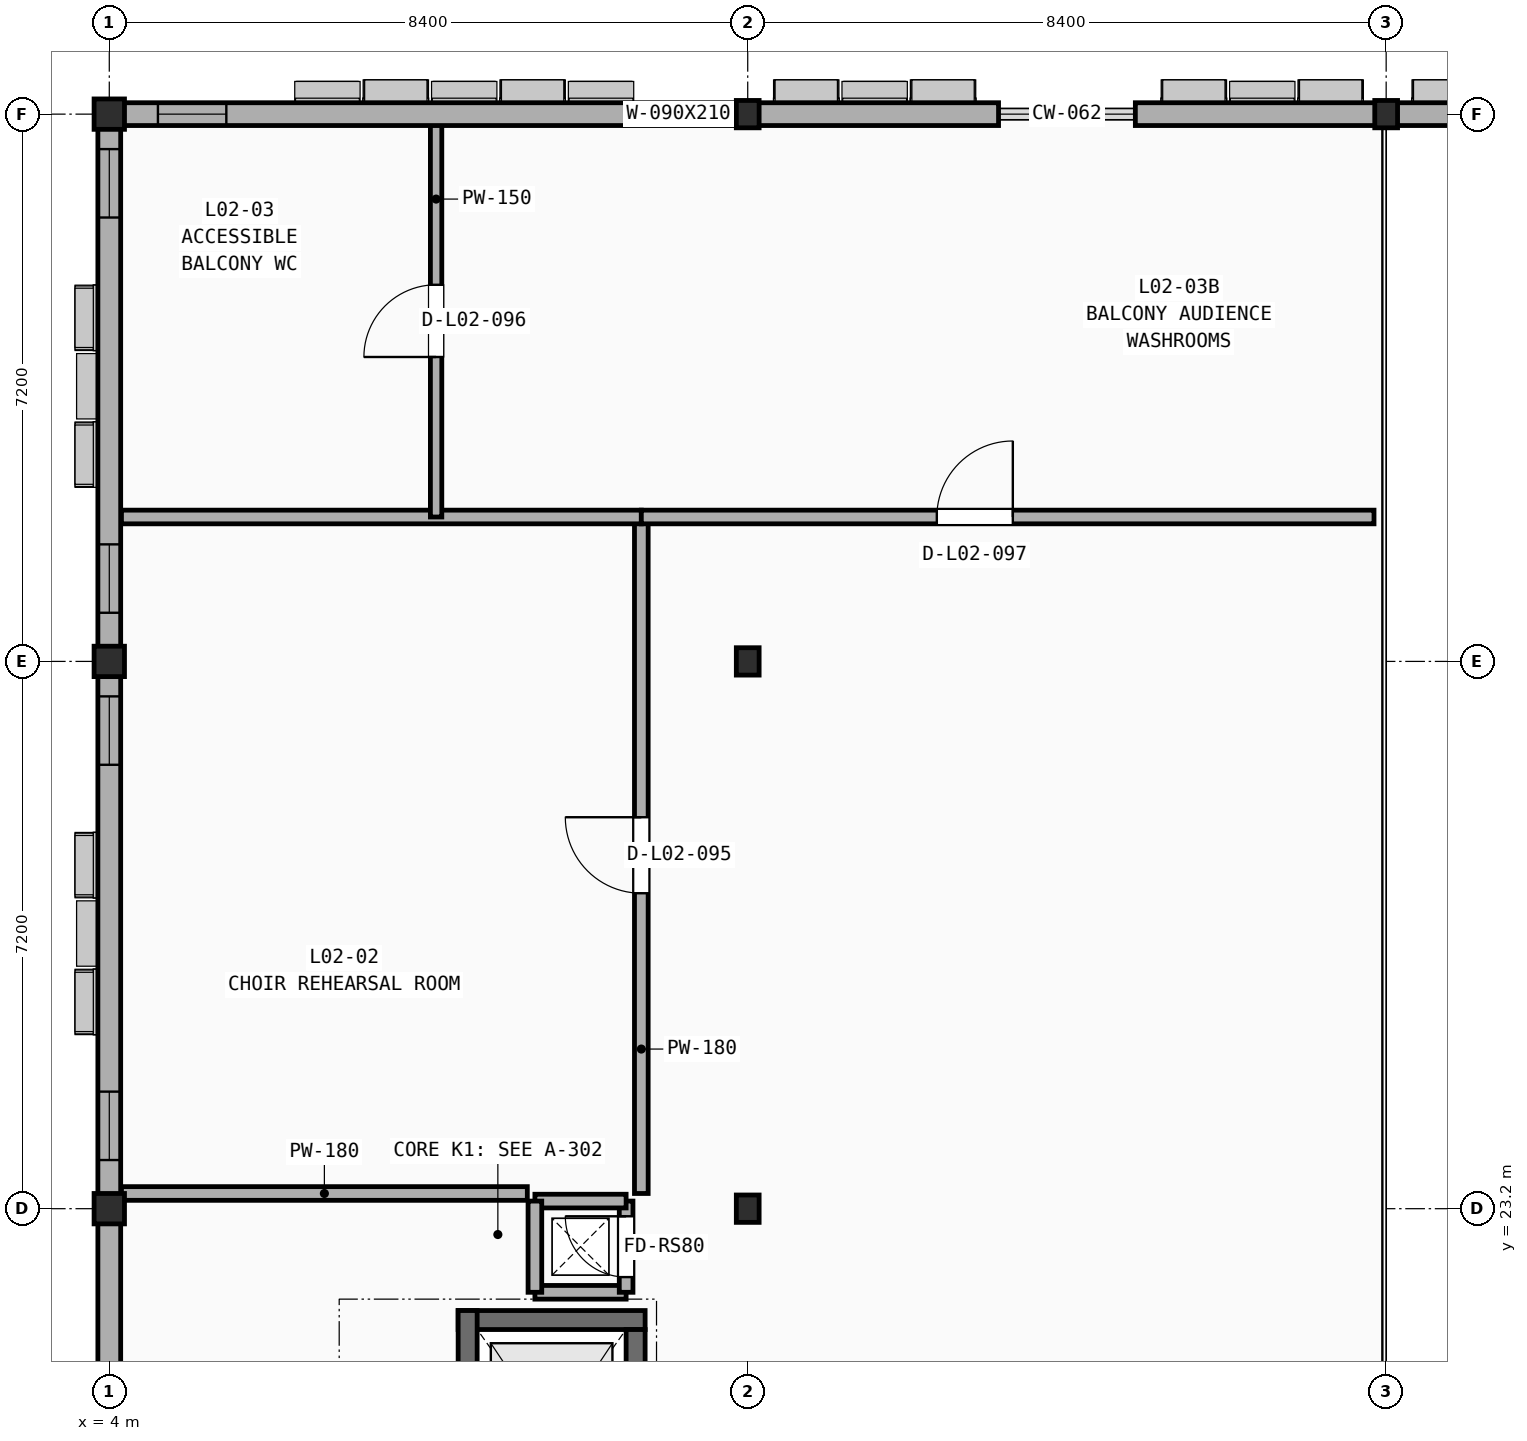
"""IFC4 building model, lengths in metres.
Left out: names, types, materials, properties, quantities, classifications, styles, units other than length and angle.
Written with IfcOpenShell. Run it as: python <this file> out.ifc"""

import sys

from ifc_helpers import new_model, si_unit, direction, frame, frame_2d, origin, origin_2d, place, context, subcontext, project, spatial, rectangle, i_section, extrude, element, fill, save


model = new_model("IFC4")
c1 = context("Model", 3, precision=1e-05, world=origin(), true_north=direction((0.0, 1.0)))
c2 = subcontext(c1, "Body", "Model", "MODEL_VIEW")
j1 = project(units=[si_unit("LENGTHUNIT", "METRE"), si_unit("PLANEANGLEUNIT", "RADIAN")], contexts=[c1])
p1 = place(None, origin())
s1 = spatial("IfcSite", under=j1, at=p1, CompositionType="ELEMENT")
p2 = place(p1, origin())
s2 = spatial("IfcBuilding", under=s1, at=p2, CompositionType="ELEMENT")
p3 = place(p2, frame((0.0, 0.0, 9.6)))
s3 = spatial("IfcBuildingStorey", under=s2, at=p3, CompositionType="ELEMENT", Elevation=9.6)
for number, where, z_axis, x_axis in (
    (1, (4.0, 23.2, 0.0), (0.0, 0.0, 1.0), (1.0, 0.0, 0.0)),
    (2, (4.0, 30.4, 0.0), (0.0, 0.0, 1.0), (1.0, 0.0, 0.0)),
    (3, (4.0, 37.6, 0.0), (0.0, 0.0, 1.0), (1.0, 0.0, 0.0)),
):
    element("IfcColumn", number, at=place(p3, frame(where, z_axis=z_axis, x_axis=x_axis)), inside=s3, PredefinedType="COLUMN", context=c2, shape_type="SweptSolid", body=[
        extrude(rectangle(XDim=0.4, YDim=0.4, at=origin_2d()), origin(), (0.0, 0.0, 1.0), 4.2),
    ])
for number, where, z_axis, x_axis in (
    (4, (12.4, 23.2, 0.0), (0.0, 0.0, 1.0), (1.0, 0.0, 0.0)),
    (5, (12.4, 30.4, 0.0), (0.0, 0.0, 1.0), (1.0, 0.0, 0.0)),
    (6, (12.4, 37.6, 0.0), (0.0, 0.0, 1.0), (1.0, 0.0, 0.0)),
    (7, (20.8, 37.6, 0.0), (0.0, 0.0, 1.0), (1.0, 0.0, 0.0)),
):
    element("IfcColumn", number, at=place(p3, frame(where, z_axis=z_axis, x_axis=x_axis)), inside=s3, PredefinedType="COLUMN", context=c2, shape_type="SweptSolid", body=[
        extrude(i_section(OverallWidth=0.3, OverallDepth=0.36, WebThickness=0.012, FlangeThickness=0.022, at=origin_2d()), origin(), (0.0, 0.0, 1.0), 4.2),
    ])
p4 = place(p3, frame((4.16, 23.4, 0.0), z_axis=(0.0, 0.0, 1.0), x_axis=(1.0, 0.0, 0.0)))
e8 = element("IfcWall", 8, at=p4, inside=s3, PredefinedType="PARTITIONING", context=c2, shape_type="SweptSolid", body=[
    extrude(rectangle(XDim=5.34, YDim=0.18, at=frame_2d((2.67, 0.0))), origin(), (0.0, 0.0, 1.0), 3.63),
])
p5 = place(p3, frame((11.0, 23.4, 0.0), z_axis=(0.0, 0.0, 1.0), x_axis=(0.0, 1.0, 0.0)))
e9 = element("IfcWall", 9, at=p5, inside=s3, PredefinedType="PARTITIONING", context=c2, shape_type="SweptSolid", body=[
    extrude(rectangle(XDim=8.9, YDim=0.18, at=frame_2d((4.45, 0.0))), origin(), (0.0, 0.0, 1.0), 3.27),
])
p6 = place(p5, frame((3.95, 0.0, -0.01)))
e10 = element("IfcOpeningElement", 10, at=p6, cuts=e9, PredefinedType="OPENING", context=c2, shape_type="SweptSolid", body=[
    extrude(rectangle(XDim=1.0, YDim=2.16, at=frame_2d((0.5, 1.08))), frame((0.0, 0.1, 0.0), z_axis=(0.0, -1.0, 0.0), x_axis=(1.0, 0.0, 0.0)), (0.0, 0.0, 1.0), 0.2),
])
p7 = place(p3, frame((4.16, 32.3, 0.0), z_axis=(0.0, 0.0, 1.0), x_axis=(1.0, 0.0, 0.0)))
e11 = element("IfcWall", 11, at=p7, inside=s3, PredefinedType="PARTITIONING", context=c2, shape_type="SweptSolid", body=[
    extrude(rectangle(XDim=6.84, YDim=0.18, at=frame_2d((3.42, 0.0))), origin(), (0.0, 0.0, 1.0), 3.59),
])
p8 = place(p3, frame((8.3, 32.3, 0.0), z_axis=(0.0, 0.0, 1.0), x_axis=(0.0, 1.0, 0.0)))
e12 = element("IfcWall", 12, at=p8, inside=s3, PredefinedType="PARTITIONING", context=c2, shape_type="SweptSolid", body=[
    extrude(rectangle(XDim=5.16, YDim=0.15, at=frame_2d((2.58, 0.0))), origin(), (0.0, 0.0, 1.0), 3.63),
])
p9 = place(p8, frame((2.105, 0.0, -0.01)))
e13 = element("IfcOpeningElement", 13, at=p9, cuts=e12, PredefinedType="OPENING", context=c2, shape_type="SweptSolid", body=[
    extrude(rectangle(XDim=0.95, YDim=2.16, at=frame_2d((0.475, 1.08))), frame((0.0, 0.085, 0.0), z_axis=(0.0, -1.0, 0.0), x_axis=(1.0, 0.0, 0.0)), (0.0, 0.0, 1.0), 0.17),
])
p10 = place(p3, frame((11.0, 32.3, 0.0), z_axis=(0.0, 0.0, 1.0), x_axis=(1.0, 0.0, 0.0)))
e14 = element("IfcWall", 14, at=p10, inside=s3, PredefinedType="PARTITIONING", context=c2, shape_type="SweptSolid", body=[
    extrude(rectangle(XDim=9.64, YDim=0.18, at=frame_2d((4.82, 0.0))), origin(), (0.0, 0.0, 1.0), 3.63),
])
p11 = place(p10, frame((3.888, 0.0, -0.01)))
e15 = element("IfcOpeningElement", 15, at=p11, cuts=e14, PredefinedType="OPENING", context=c2, shape_type="SweptSolid", body=[
    extrude(rectangle(XDim=1.0, YDim=2.16, at=frame_2d((0.5, 1.08))), frame((0.0, 0.1, 0.0), z_axis=(0.0, -1.0, 0.0), x_axis=(1.0, 0.0, 0.0)), (0.0, 0.0, 1.0), 0.2),
])
p12 = place(p3, frame((12.4, 37.6, 0.0), z_axis=(0.0, 0.0, 1.0), x_axis=(-1.0, 0.0, 0.0)))
e16 = element("IfcWall", 16, at=p12, inside=s3, PredefinedType="SOLIDWALL", context=c2, shape_type="SweptSolid", body=[
    extrude(rectangle(XDim=8.4, YDim=0.3, at=frame_2d((4.2, 0.0))), origin(), (0.0, 0.0, 1.0), 3.59),
])
p13 = place(p12, frame((0.46, 0.0, 0.85)))
e17 = element("IfcOpeningElement", 17, at=p13, cuts=e16, PredefinedType="OPENING", context=c2, shape_type="SweptSolid", body=[
    extrude(rectangle(XDim=0.9, YDim=2.1, at=frame_2d((0.45, 1.05))), frame((0.0, 0.16, 0.0), z_axis=(0.0, -1.0, 0.0), x_axis=(1.0, 0.0, 0.0)), (0.0, 0.0, 1.0), 0.32),
])
p14 = place(p12, frame((6.86, 0.0, 0.85)))
e18 = element("IfcOpeningElement", 18, at=p14, cuts=e16, PredefinedType="OPENING", context=c2, shape_type="SweptSolid", body=[
    extrude(rectangle(XDim=0.9, YDim=2.1, at=frame_2d((0.45, 1.05))), frame((0.0, 0.16, 0.0), z_axis=(0.0, -1.0, 0.0), x_axis=(1.0, 0.0, 0.0)), (0.0, 0.0, 1.0), 0.32),
])
for number, where, z_axis, x_axis in (
    (19, (20.8, 37.6, 0.0), (0.0, 0.0, 1.0), (-1.0, 0.0, 0.0)),
    (20, (15.7, 37.6, 0.0), (0.0, 0.0, 1.0), (-1.0, 0.0, 0.0)),
    (21, (24.1, 37.6, 0.0), (0.0, 0.0, 1.0), (-1.0, 0.0, 0.0)),
):
    element("IfcWall", number, at=place(p3, frame(where, z_axis=z_axis, x_axis=x_axis)), inside=s3, PredefinedType="SOLIDWALL", context=c2, shape_type="SweptSolid", body=[
        extrude(rectangle(XDim=3.3, YDim=0.3, at=frame_2d((1.65, 0.0))), origin(), (0.0, 0.0, 1.0), 4.2),
    ])
p15 = place(p3, frame((4.0, 23.2, 0.0), z_axis=(0.0, 0.0, 1.0), x_axis=(0.0, -1.0, 0.0)))
e22 = element("IfcWall", 22, at=p15, inside=s3, PredefinedType="SOLIDWALL", context=c2, shape_type="SweptSolid", body=[
    extrude(rectangle(XDim=7.2, YDim=0.3, at=frame_2d((3.6, 0.0))), origin(), (0.0, 0.0, 1.0), 3.63),
])
p16 = place(p3, frame((4.0, 30.4, 0.0), z_axis=(0.0, 0.0, 1.0), x_axis=(0.0, -1.0, 0.0)))
e23 = element("IfcWall", 23, at=p16, inside=s3, PredefinedType="SOLIDWALL", context=c2, shape_type="SweptSolid", body=[
    extrude(rectangle(XDim=7.2, YDim=0.3, at=frame_2d((3.6, 0.0))), origin(), (0.0, 0.0, 1.0), 3.27),
])
p17 = place(p16, frame((0.46, 0.0, 0.85)))
e24 = element("IfcOpeningElement", 24, at=p17, cuts=e23, PredefinedType="OPENING", context=c2, shape_type="SweptSolid", body=[
    extrude(rectangle(XDim=0.9, YDim=2.1, at=frame_2d((0.45, 1.05))), frame((0.0, 0.16, 0.0), z_axis=(0.0, -1.0, 0.0), x_axis=(1.0, 0.0, 0.0)), (0.0, 0.0, 1.0), 0.32),
])
p18 = place(p16, frame((5.66, 0.0, 0.85)))
e25 = element("IfcOpeningElement", 25, at=p18, cuts=e23, PredefinedType="OPENING", context=c2, shape_type="SweptSolid", body=[
    extrude(rectangle(XDim=0.9, YDim=2.1, at=frame_2d((0.45, 1.05))), frame((0.0, 0.16, 0.0), z_axis=(0.0, -1.0, 0.0), x_axis=(1.0, 0.0, 0.0)), (0.0, 0.0, 1.0), 0.32),
])
p19 = place(p3, frame((4.0, 37.6, 0.0), z_axis=(0.0, 0.0, 1.0), x_axis=(0.0, -1.0, 0.0)))
e26 = element("IfcWall", 26, at=p19, inside=s3, PredefinedType="SOLIDWALL", context=c2, shape_type="SweptSolid", body=[
    extrude(rectangle(XDim=7.2, YDim=0.3, at=frame_2d((3.6, 0.0))), origin(), (0.0, 0.0, 1.0), 3.27),
])
p20 = place(p19, frame((0.46, 0.0, 0.85)))
e27 = element("IfcOpeningElement", 27, at=p20, cuts=e26, PredefinedType="OPENING", context=c2, shape_type="SweptSolid", body=[
    extrude(rectangle(XDim=0.9, YDim=2.1, at=frame_2d((0.45, 1.05))), frame((0.0, 0.16, 0.0), z_axis=(0.0, -1.0, 0.0), x_axis=(1.0, 0.0, 0.0)), (0.0, 0.0, 1.0), 0.32),
])
p21 = place(p19, frame((5.66, 0.0, 0.85)))
e28 = element("IfcOpeningElement", 28, at=p21, cuts=e26, PredefinedType="OPENING", context=c2, shape_type="SweptSolid", body=[
    extrude(rectangle(XDim=0.9, YDim=2.1, at=frame_2d((0.45, 1.05))), frame((0.0, 0.16, 0.0), z_axis=(0.0, -1.0, 0.0), x_axis=(1.0, 0.0, 0.0)), (0.0, 0.0, 1.0), 0.32),
])
p22 = place(p3, frame((8.59, 21.735, 0.0), z_axis=(0.0, 0.0, 1.0), x_axis=(1.0, 0.0, 0.0)))
e29 = element("IfcWall", 29, at=p22, inside=s3, PredefinedType="SHEAR", context=c2, shape_type="SweptSolid", body=[
    extrude(rectangle(XDim=2.46, YDim=0.25, at=frame_2d((1.23, 0.0))), origin(), (0.0, 0.0, 1.0), 4.2),
])
p23 = place(p3, frame((10.925, 18.85, 0.0), z_axis=(0.0, 0.0, 1.0), x_axis=(0.0, 1.0, 0.0)))
e30 = element("IfcWall", 30, at=p23, inside=s3, PredefinedType="SHEAR", context=c2, shape_type="SweptSolid", body=[
    extrude(rectangle(XDim=2.76, YDim=0.25, at=frame_2d((1.38, 0.0))), origin(), (0.0, 0.0, 1.0), 4.2),
])
p24 = place(p23, frame((0.83, 0.0, -0.01)))
e31 = element("IfcOpeningElement", 31, at=p24, cuts=e30, PredefinedType="OPENING", context=c2, shape_type="SweptSolid", body=[
    extrude(rectangle(XDim=1.1, YDim=2.16, at=frame_2d((0.55, 1.08))), frame((0.0, 0.135, 0.0), z_axis=(0.0, -1.0, 0.0), x_axis=(1.0, 0.0, 0.0)), (0.0, 0.0, 1.0), 0.27),
])
p25 = place(p3, frame((8.715, 18.85, 0.0), z_axis=(0.0, 0.0, 1.0), x_axis=(0.0, 1.0, 0.0)))
e32 = element("IfcWall", 32, at=p25, inside=s3, PredefinedType="SHEAR", context=c2, shape_type="SweptSolid", body=[
    extrude(rectangle(XDim=3.01, YDim=0.25, at=frame_2d((1.505, 0.0))), origin(), (0.0, 0.0, 1.0), 4.2),
])
p26 = place(p3, frame((9.6, 22.1, 0.0), z_axis=(0.0, 0.0, 1.0), x_axis=(1.0, 0.0, 0.0)))
e33 = element("IfcWall", 33, at=p26, inside=s3, PredefinedType="SOLIDWALL", context=c2, shape_type="SweptSolid", body=[
    extrude(rectangle(XDim=1.2, YDim=0.18, at=frame_2d((0.6, 0.0))), origin(), (0.0, 0.0, 1.0), 3.97),
])
p27 = place(p3, frame((10.8, 22.1, 0.0), z_axis=(0.0, 0.0, 1.0), x_axis=(0.0, 1.0, 0.0)))
e34 = element("IfcWall", 34, at=p27, inside=s3, PredefinedType="SOLIDWALL", context=c2, shape_type="SweptSolid", body=[
    extrude(rectangle(XDim=1.2, YDim=0.18, at=frame_2d((0.6, 0.0))), origin(), (0.0, 0.0, 1.0), 3.97),
])
p28 = place(p27, frame((0.2, 0.0, -0.01)))
e35 = element("IfcOpeningElement", 35, at=p28, cuts=e34, PredefinedType="OPENING", context=c2, shape_type="SweptSolid", body=[
    extrude(rectangle(XDim=0.8, YDim=2.06, at=frame_2d((0.4, 1.03))), frame((0.0, 0.1, 0.0), z_axis=(0.0, -1.0, 0.0), x_axis=(1.0, 0.0, 0.0)), (0.0, 0.0, 1.0), 0.2),
])
for number, where, z_axis, x_axis in (
    (36, (10.8, 23.3, 0.0), (0.0, 0.0, 1.0), (-1.0, 0.0, 0.0)),
    (37, (9.6, 23.3, 0.0), (0.0, 0.0, 1.0), (0.0, -1.0, 0.0)),
):
    element("IfcWall", number, at=place(p3, frame(where, z_axis=z_axis, x_axis=x_axis)), inside=s3, PredefinedType="SOLIDWALL", context=c2, shape_type="SweptSolid", body=[
        extrude(rectangle(XDim=1.2, YDim=0.18, at=frame_2d((0.6, 0.0))), origin(), (0.0, 0.0, 1.0), 3.97),
    ])
p29 = place(p6, frame((0.0, 0.0, 0.01)))
e38 = element("IfcDoor", 38, at=p29, inside=s3, OperationType="SINGLE_SWING_RIGHT", PredefinedType="DOOR", context=c2, shape_type="SweptSolid", body=[
    extrude(rectangle(XDim=1.0, YDim=2.15, at=frame_2d((0.5, 1.075))), frame((0.0, 0.025, 0.0), z_axis=(0.0, -1.0, 0.0), x_axis=(1.0, 0.0, 0.0)), (0.0, 0.0, 1.0), 0.05),
])
fill(e10, e38)
p30 = place(p9, frame((0.95, 0.0, 0.01), z_axis=(0.0, 0.0, 1.0), x_axis=(-1.0, 0.0, 0.0)))
e39 = element("IfcDoor", 39, at=p30, inside=s3, OperationType="SINGLE_SWING_LEFT", PredefinedType="DOOR", context=c2, shape_type="SweptSolid", body=[
    extrude(rectangle(XDim=0.95, YDim=2.15, at=frame_2d((0.475, 1.075))), frame((0.0, 0.025, 0.0), z_axis=(0.0, -1.0, 0.0), x_axis=(1.0, 0.0, 0.0)), (0.0, 0.0, 1.0), 0.05),
])
fill(e13, e39)
p31 = place(p11, frame((0.0, 0.0, 0.01)))
e40 = element("IfcDoor", 40, at=p31, inside=s3, OperationType="SINGLE_SWING_RIGHT", PredefinedType="DOOR", context=c2, shape_type="SweptSolid", body=[
    extrude(rectangle(XDim=1.0, YDim=2.15, at=frame_2d((0.5, 1.075))), frame((0.0, 0.025, 0.0), z_axis=(0.0, -1.0, 0.0), x_axis=(1.0, 0.0, 0.0)), (0.0, 0.0, 1.0), 0.05),
])
fill(e15, e40)
p32 = place(p13, origin())
e41 = element("IfcWindow", 41, at=p32, inside=s3, PartitioningType="SINGLE_PANEL", PredefinedType="WINDOW", context=c2, shape_type="SweptSolid", body=[
    extrude(rectangle(XDim=0.9, YDim=2.1, at=frame_2d((0.45, 1.05))), frame((0.0, 0.03, 0.0), z_axis=(0.0, -1.0, 0.0), x_axis=(1.0, 0.0, 0.0)), (0.0, 0.0, 1.0), 0.06),
])
fill(e17, e41)
p33 = place(p14, origin())
e42 = element("IfcWindow", 42, at=p33, inside=s3, PartitioningType="SINGLE_PANEL", PredefinedType="WINDOW", context=c2, shape_type="SweptSolid", body=[
    extrude(rectangle(XDim=0.9, YDim=2.1, at=frame_2d((0.45, 1.05))), frame((0.0, 0.03, 0.0), z_axis=(0.0, -1.0, 0.0), x_axis=(1.0, 0.0, 0.0)), (0.0, 0.0, 1.0), 0.06),
])
fill(e18, e42)
p34 = place(p17, origin())
e43 = element("IfcWindow", 43, at=p34, inside=s3, PartitioningType="SINGLE_PANEL", PredefinedType="WINDOW", context=c2, shape_type="SweptSolid", body=[
    extrude(rectangle(XDim=0.9, YDim=2.1, at=frame_2d((0.45, 1.05))), frame((0.0, 0.03, 0.0), z_axis=(0.0, -1.0, 0.0), x_axis=(1.0, 0.0, 0.0)), (0.0, 0.0, 1.0), 0.06),
])
fill(e24, e43)
p35 = place(p18, origin())
e44 = element("IfcWindow", 44, at=p35, inside=s3, PartitioningType="SINGLE_PANEL", PredefinedType="WINDOW", context=c2, shape_type="SweptSolid", body=[
    extrude(rectangle(XDim=0.9, YDim=2.1, at=frame_2d((0.45, 1.05))), frame((0.0, 0.03, 0.0), z_axis=(0.0, -1.0, 0.0), x_axis=(1.0, 0.0, 0.0)), (0.0, 0.0, 1.0), 0.06),
])
fill(e25, e44)
p36 = place(p20, origin())
e45 = element("IfcWindow", 45, at=p36, inside=s3, PartitioningType="SINGLE_PANEL", PredefinedType="WINDOW", context=c2, shape_type="SweptSolid", body=[
    extrude(rectangle(XDim=0.9, YDim=2.1, at=frame_2d((0.45, 1.05))), frame((0.0, 0.03, 0.0), z_axis=(0.0, -1.0, 0.0), x_axis=(1.0, 0.0, 0.0)), (0.0, 0.0, 1.0), 0.06),
])
fill(e27, e45)
p37 = place(p21, origin())
e46 = element("IfcWindow", 46, at=p37, inside=s3, PartitioningType="SINGLE_PANEL", PredefinedType="WINDOW", context=c2, shape_type="SweptSolid", body=[
    extrude(rectangle(XDim=0.9, YDim=2.1, at=frame_2d((0.45, 1.05))), frame((0.0, 0.03, 0.0), z_axis=(0.0, -1.0, 0.0), x_axis=(1.0, 0.0, 0.0)), (0.0, 0.0, 1.0), 0.06),
])
fill(e28, e46)
p38 = place(p28, frame((0.0, 0.0, 0.01)))
e47 = element("IfcDoor", 47, at=p38, inside=s3, OperationType="SINGLE_SWING_RIGHT", PredefinedType="DOOR", context=c2, shape_type="SweptSolid", body=[
    extrude(rectangle(XDim=0.8, YDim=2.05, at=frame_2d((0.4, 1.025))), frame((0.0, 0.025, 0.0), z_axis=(0.0, -1.0, 0.0), x_axis=(1.0, 0.0, 0.0)), (0.0, 0.0, 1.0), 0.05),
])
fill(e35, e47)
save(model, sys.argv[1])
